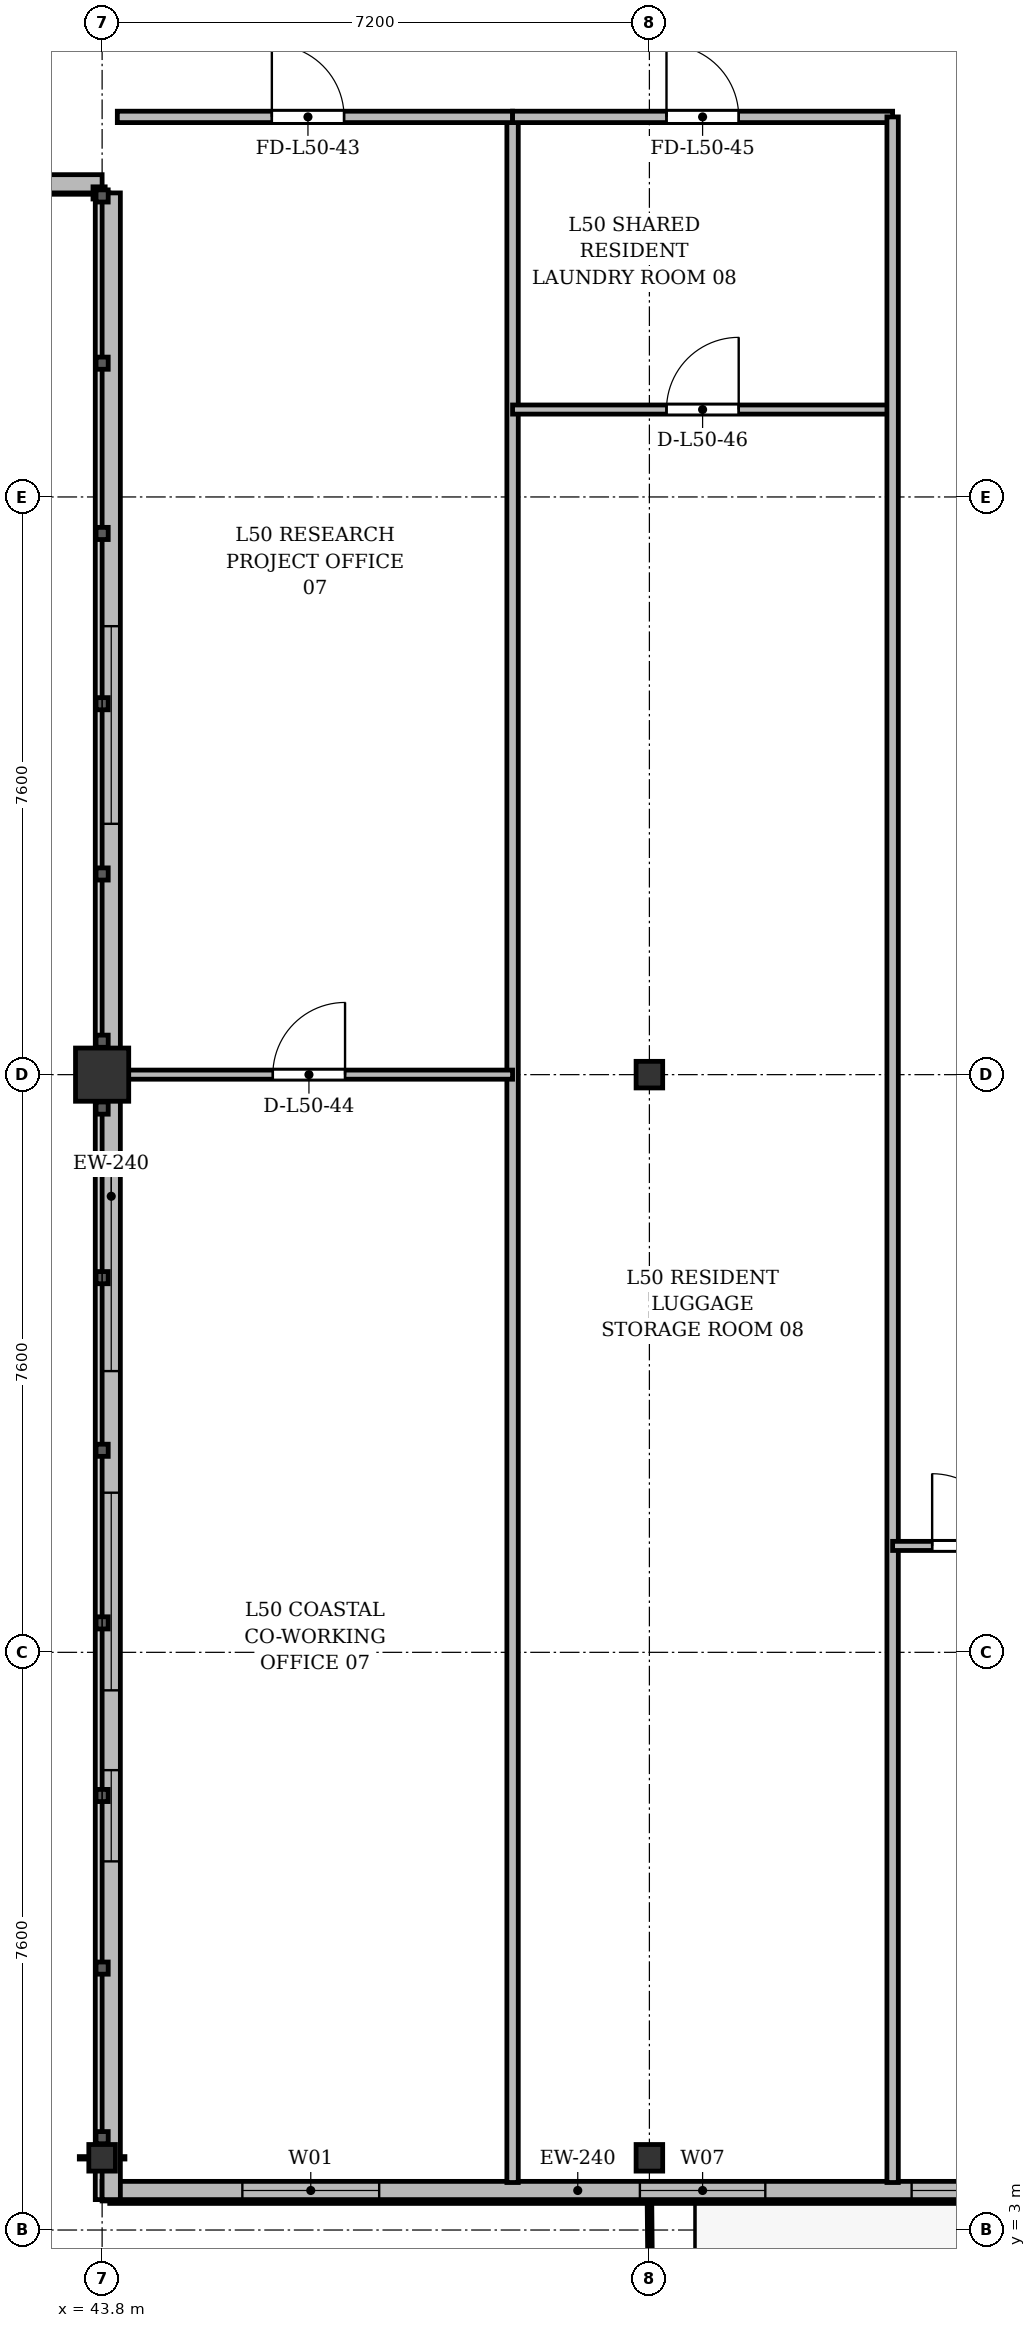
"""IFC4 building model, lengths in metres.
Left out: names, types, materials, properties, quantities, classifications, styles, units other than length and angle.
Written with IfcOpenShell. Run it as: python <this file> out.ifc"""

import sys

from ifc_helpers import new_model, si_unit, direction, frame, frame_2d, origin, origin_2d, place, context, subcontext, project, spatial, rectangle, i_section, extrude, source, transform, mapped, element, fill, save


model = new_model("IFC4")
c1 = context("Model", 3, precision=1e-05, world=origin(), true_north=direction((0.0, 1.0)))
c2 = subcontext(c1, "Body", "Model", "MODEL_VIEW")
j1 = project(units=[si_unit("LENGTHUNIT", "METRE"), si_unit("PLANEANGLEUNIT", "RADIAN")], contexts=[c1])
p1 = place(None, origin())
s1 = spatial("IfcSite", under=j1, at=p1, CompositionType="ELEMENT")
p2 = place(p1, origin())
s2 = spatial("IfcBuilding", under=s1, at=p2, CompositionType="ELEMENT")
p3 = place(p2, frame((0.0, 0.0, 194.1)))
s3 = spatial("IfcBuildingStorey", under=s2, at=p3, CompositionType="ELEMENT", Elevation=194.1)
m1 = source(origin(), c2, "Body", "SweptSolid", [
    extrude(i_section(OverallWidth=0.35, OverallDepth=0.35, WebThickness=0.018, FlangeThickness=0.028, at=origin_2d()), origin(), (0.0, 0.0, 1.0), 3.6),
])
p4 = place(p3, frame((43.8, 3.95, 0.0), z_axis=(0.0, 0.0, 1.0), x_axis=(1.0, 0.0, 0.0)))
e1 = element("IfcColumn", 1, at=p4, inside=s3, PredefinedType="COLUMN", context=c2, shape_type="MappedRepresentation", body=[
    mapped(m1, transform((0.0, 0.0, 0.0), x_axis=(1.0, 0.0, 0.0), y_axis=(0.0, 1.0, 0.0), z_axis=(0.0, 0.0, 1.0), scale=1.0)),
])
m2 = source(origin(), c2, "Body", "SweptSolid", [
    extrude(rectangle(XDim=0.7, YDim=0.7, at=origin_2d()), origin(), (0.0, 0.0, 1.0), 3.6),
])
p5 = place(p3, frame((43.8, 18.2, 0.0), z_axis=(0.0, 0.0, 1.0), x_axis=(1.0, 0.0, 0.0)))
e2 = element("IfcColumn", 2, at=p5, inside=s3, PredefinedType="COLUMN", context=c2, shape_type="MappedRepresentation", body=[
    mapped(m2, transform((0.0, 0.0, 0.0), x_axis=(1.0, 0.0, 0.0), y_axis=(0.0, 1.0, 0.0), z_axis=(0.0, 0.0, 1.0), scale=1.0)),
])
for number, where, z_axis, x_axis in (
    (3, (51.0, 3.95, 0.0), (0.0, 0.0, 1.0), (1.0, 0.0, 0.0)),
    (4, (51.0, 18.2, 0.0), (0.0, 0.0, 1.0), (1.0, 0.0, 0.0)),
):
    element("IfcColumn", number, at=place(p3, frame(where, z_axis=z_axis, x_axis=x_axis)), inside=s3, PredefinedType="COLUMN", context=c2, shape_type="MappedRepresentation", body=[
        mapped(m1, transform((0.0, 0.0, 0.0), x_axis=(1.0, 0.0, 0.0), y_axis=(0.0, 1.0, 0.0), z_axis=(0.0, 0.0, 1.0), scale=1.0)),
    ])
p6 = place(p3, frame((63.4, 3.52, 0.0), z_axis=(0.0, 0.0, 1.0), x_axis=(-1.0, 0.0, 0.0)))
e5 = element("IfcWall", 5, at=p6, inside=s3, PredefinedType="SOLIDWALL", context=c2, shape_type="SweptSolid", body=[
    extrude(rectangle(XDim=19.6, YDim=0.24, at=frame_2d((9.8, 0.0))), origin(), (0.0, 0.0, 1.0), 3.36),
])
p7 = place(p6, frame((0.395, 0.0, 0.9)))
e6 = element("IfcOpeningElement", 6, at=p7, cuts=e5, PredefinedType="OPENING", context=c2, shape_type="SweptSolid", body=[
    extrude(rectangle(XDim=1.5, YDim=1.75, at=frame_2d((0.75, 0.875))), frame((0.0, 0.13, 0.0), z_axis=(0.0, -1.0, 0.0), x_axis=(1.0, 0.0, 0.0)), (0.0, 0.0, 1.0), 0.26),
])
p8 = place(p6, frame((2.7, 0.0, 0.9)))
e7 = element("IfcOpeningElement", 7, at=p8, cuts=e5, PredefinedType="OPENING", context=c2, shape_type="SweptSolid", body=[
    extrude(rectangle(XDim=1.5, YDim=1.75, at=frame_2d((0.75, 0.875))), frame((0.0, 0.13, 0.0), z_axis=(0.0, -1.0, 0.0), x_axis=(1.0, 0.0, 0.0)), (0.0, 0.0, 1.0), 0.26),
])
p9 = place(p6, frame((5.585, 0.0, 0.0)))
e8 = element("IfcOpeningElement", 8, at=p9, cuts=e5, PredefinedType="OPENING", context=c2, shape_type="SweptSolid", body=[
    extrude(rectangle(XDim=1.2, YDim=2.2, at=frame_2d((0.6, 1.1))), frame((0.0, 0.13, 0.0), z_axis=(0.0, -1.0, 0.0), x_axis=(1.0, 0.0, 0.0)), (0.0, 0.0, 1.0), 0.26),
])
p10 = place(p6, frame((7.45, 0.0, 0.9)))
e9 = element("IfcOpeningElement", 9, at=p10, cuts=e5, PredefinedType="OPENING", context=c2, shape_type="SweptSolid", body=[
    extrude(rectangle(XDim=1.5, YDim=1.75, at=frame_2d((0.75, 0.875))), frame((0.0, 0.13, 0.0), z_axis=(0.0, -1.0, 0.0), x_axis=(1.0, 0.0, 0.0)), (0.0, 0.0, 1.0), 0.26),
])
p11 = place(p6, frame((10.875, 0.0, 0.9)))
e10 = element("IfcOpeningElement", 10, at=p11, cuts=e5, PredefinedType="OPENING", context=c2, shape_type="SweptSolid", body=[
    extrude(rectangle(XDim=1.65, YDim=1.85, at=frame_2d((0.825, 0.925))), frame((0.0, 0.13, 0.0), z_axis=(0.0, -1.0, 0.0), x_axis=(1.0, 0.0, 0.0)), (0.0, 0.0, 1.0), 0.26),
])
p12 = place(p6, frame((15.955, 0.0, 0.9)))
e11 = element("IfcOpeningElement", 11, at=p12, cuts=e5, PredefinedType="OPENING", context=c2, shape_type="SweptSolid", body=[
    extrude(rectangle(XDim=1.8, YDim=1.8, at=frame_2d((0.9, 0.9))), frame((0.0, 0.13, 0.0), z_axis=(0.0, -1.0, 0.0), x_axis=(1.0, 0.0, 0.0)), (0.0, 0.0, 1.0), 0.26),
])
p13 = place(p3, frame((43.92, 3.4, 0.0), z_axis=(0.0, 0.0, 1.0), x_axis=(0.0, 1.0, 0.0)))
e12 = element("IfcWall", 12, at=p13, inside=s3, PredefinedType="SOLIDWALL", context=c2, shape_type="SweptSolid", body=[
    extrude(rectangle(XDim=26.4, YDim=0.24, at=frame_2d((13.2, 0.0))), origin(), (0.0, 0.0, 1.0), 2.86),
])
p14 = place(p13, frame((4.45, 0.0, 0.92)))
e13 = element("IfcOpeningElement", 13, at=p14, cuts=e12, PredefinedType="OPENING", context=c2, shape_type="SweptSolid", body=[
    extrude(rectangle(XDim=1.2, YDim=1.65, at=frame_2d((0.6, 0.825))), frame((0.0, 0.13, 0.0), z_axis=(0.0, -1.0, 0.0), x_axis=(1.0, 0.0, 0.0)), (0.0, 0.0, 1.0), 0.26),
])
p15 = place(p13, frame((6.7, 0.0, 0.92)))
e14 = element("IfcOpeningElement", 14, at=p15, cuts=e12, PredefinedType="OPENING", context=c2, shape_type="SweptSolid", body=[
    extrude(rectangle(XDim=2.6, YDim=1.84, at=frame_2d((1.3, 0.92))), frame((0.0, 0.13, 0.0), z_axis=(0.0, -1.0, 0.0), x_axis=(1.0, 0.0, 0.0)), (0.0, 0.0, 1.0), 0.26),
])
p16 = place(p13, frame((10.9, 0.0, 0.92)))
e15 = element("IfcOpeningElement", 15, at=p16, cuts=e12, PredefinedType="OPENING", context=c2, shape_type="SweptSolid", body=[
    extrude(rectangle(XDim=2.6, YDim=1.84, at=frame_2d((1.3, 0.92))), frame((0.0, 0.13, 0.0), z_axis=(0.0, -1.0, 0.0), x_axis=(1.0, 0.0, 0.0)), (0.0, 0.0, 1.0), 0.26),
])
p17 = place(p13, frame((18.1, 0.0, 0.92)))
e16 = element("IfcOpeningElement", 16, at=p17, cuts=e12, PredefinedType="OPENING", context=c2, shape_type="SweptSolid", body=[
    extrude(rectangle(XDim=2.6, YDim=1.84, at=frame_2d((1.3, 0.92))), frame((0.0, 0.13, 0.0), z_axis=(0.0, -1.0, 0.0), x_axis=(1.0, 0.0, 0.0)), (0.0, 0.0, 1.0), 0.26),
])
p18 = place(p3, frame((43.8, 29.92, 0.0), z_axis=(0.0, 0.0, 1.0), x_axis=(-1.0, 0.0, 0.0)))
e17 = element("IfcWall", 17, at=p18, inside=s3, PredefinedType="SOLIDWALL", context=c2, shape_type="SweptSolid", body=[
    extrude(rectangle(XDim=13.2, YDim=0.24, at=frame_2d((6.6, 0.0))), origin(), (0.0, 0.0, 1.0), 2.86),
])
p19 = place(p18, frame((5.7, 0.0, 0.9)))
e18 = element("IfcOpeningElement", 18, at=p19, cuts=e17, PredefinedType="OPENING", context=c2, shape_type="SweptSolid", body=[
    extrude(rectangle(XDim=1.8, YDim=1.8, at=frame_2d((0.9, 0.9))), frame((0.0, 0.13, 0.0), z_axis=(0.0, -1.0, 0.0), x_axis=(1.0, 0.0, 0.0)), (0.0, 0.0, 1.0), 0.26),
])
p20 = place(p3, frame((49.2, 3.625, 0.0), z_axis=(0.0, 0.0, 1.0), x_axis=(0.0, 1.0, 0.0)))
e19 = element("IfcWall", 19, at=p20, inside=s3, PredefinedType="PARTITIONING", context=c2, shape_type="SweptSolid", body=[
    extrude(rectangle(XDim=27.175, YDim=0.15, at=frame_2d((13.587, 0.0))), origin(), (0.0, 0.0, 1.0), 2.91),
])
p21 = place(p3, frame((44.0, 30.8, 0.0), z_axis=(0.0, 0.0, 1.0), x_axis=(1.0, 0.0, 0.0)))
e20 = element("IfcWall", 20, at=p21, inside=s3, PredefinedType="PARTITIONING", context=c2, shape_type="SweptSolid", body=[
    extrude(rectangle(XDim=5.2, YDim=0.15, at=frame_2d((2.6, 0.0))), origin(), (0.0, 0.0, 1.0), 3.36),
])
p22 = place(p21, frame((2.033, 0.0, 0.0)))
e21 = element("IfcOpeningElement", 21, at=p22, cuts=e20, PredefinedType="OPENING", context=c2, shape_type="SweptSolid", body=[
    extrude(rectangle(XDim=0.95, YDim=2.15, at=frame_2d((0.475, 1.075))), frame((0.0, 0.085, 0.0), z_axis=(0.0, -1.0, 0.0), x_axis=(1.0, 0.0, 0.0)), (0.0, 0.0, 1.0), 0.17),
])
p23 = place(p3, frame((44.025, 18.2, 0.0), z_axis=(0.0, 0.0, 1.0), x_axis=(1.0, 0.0, 0.0)))
e22 = element("IfcWall", 22, at=p23, inside=s3, PredefinedType="PARTITIONING", context=c2, shape_type="SweptSolid", body=[
    extrude(rectangle(XDim=5.175, YDim=0.12, at=frame_2d((2.587, 0.0))), origin(), (0.0, 0.0, 1.0), 2.91),
])
p24 = place(p23, frame((2.021, 0.0, 0.0)))
e23 = element("IfcOpeningElement", 23, at=p24, cuts=e22, PredefinedType="OPENING", context=c2, shape_type="SweptSolid", body=[
    extrude(rectangle(XDim=0.95, YDim=2.15, at=frame_2d((0.475, 1.075))), frame((0.0, 0.07, 0.0), z_axis=(0.0, -1.0, 0.0), x_axis=(1.0, 0.0, 0.0)), (0.0, 0.0, 1.0), 0.14),
])
p25 = place(p3, frame((49.2, 30.8, 0.0), z_axis=(0.0, 0.0, 1.0), x_axis=(1.0, 0.0, 0.0)))
e24 = element("IfcWall", 24, at=p25, inside=s3, PredefinedType="PARTITIONING", context=c2, shape_type="SweptSolid", body=[
    extrude(rectangle(XDim=5.0, YDim=0.15, at=frame_2d((2.5, 0.0))), origin(), (0.0, 0.0, 1.0), 2.86),
])
p26 = place(p25, frame((2.025, 0.0, 0.0)))
e25 = element("IfcOpeningElement", 25, at=p26, cuts=e24, PredefinedType="OPENING", context=c2, shape_type="SweptSolid", body=[
    extrude(rectangle(XDim=0.95, YDim=2.15, at=frame_2d((0.475, 1.075))), frame((0.0, 0.085, 0.0), z_axis=(0.0, -1.0, 0.0), x_axis=(1.0, 0.0, 0.0)), (0.0, 0.0, 1.0), 0.17),
])
p27 = place(p3, frame((49.2, 26.95, 0.0), z_axis=(0.0, 0.0, 1.0), x_axis=(1.0, 0.0, 0.0)))
e26 = element("IfcWall", 26, at=p27, inside=s3, PredefinedType="PARTITIONING", context=c2, shape_type="SweptSolid", body=[
    extrude(rectangle(XDim=5.0, YDim=0.12, at=frame_2d((2.5, 0.0))), origin(), (0.0, 0.0, 1.0), 2.86),
])
p28 = place(p27, frame((2.025, 0.0, 0.0)))
e27 = element("IfcOpeningElement", 27, at=p28, cuts=e26, PredefinedType="OPENING", context=c2, shape_type="SweptSolid", body=[
    extrude(rectangle(XDim=0.95, YDim=2.15, at=frame_2d((0.475, 1.075))), frame((0.0, 0.07, 0.0), z_axis=(0.0, -1.0, 0.0), x_axis=(1.0, 0.0, 0.0)), (0.0, 0.0, 1.0), 0.14),
])
p29 = place(p3, frame((54.2, 3.625, 0.0), z_axis=(0.0, 0.0, 1.0), x_axis=(0.0, 1.0, 0.0)))
e28 = element("IfcWall", 28, at=p29, inside=s3, PredefinedType="PARTITIONING", context=c2, shape_type="SweptSolid", body=[
    extrude(rectangle(XDim=27.175, YDim=0.15, at=frame_2d((13.587, 0.0))), origin(), (0.0, 0.0, 1.0), 2.91),
])
p30 = place(p3, frame((54.2, 12.0, 0.0), z_axis=(0.0, 0.0, 1.0), x_axis=(1.0, 0.0, 0.0)))
e29 = element("IfcWall", 29, at=p30, inside=s3, PredefinedType="PARTITIONING", context=c2, shape_type="SweptSolid", body=[
    extrude(rectangle(XDim=2.0, YDim=0.12, at=frame_2d((1.0, 0.0))), origin(), (0.0, 0.0, 1.0), 3.36),
])
p31 = place(p30, frame((0.52, 0.0, 0.0)))
e30 = element("IfcOpeningElement", 30, at=p31, cuts=e29, PredefinedType="OPENING", context=c2, shape_type="SweptSolid", body=[
    extrude(rectangle(XDim=0.95, YDim=2.15, at=frame_2d((0.475, 1.075))), frame((0.0, 0.07, 0.0), z_axis=(0.0, -1.0, 0.0), x_axis=(1.0, 0.0, 0.0)), (0.0, 0.0, 1.0), 0.14),
])
m3 = source(origin(), c2, "Body", "SweptSolid", [
    extrude(rectangle(XDim=1.5, YDim=1.75, at=frame_2d((0.75, 0.875))), frame((0.0, 0.03, 0.0), z_axis=(0.0, -1.0, 0.0), x_axis=(1.0, 0.0, 0.0)), (0.0, 0.0, 1.0), 0.06),
])
p32 = place(p10, origin())
e31 = element("IfcWindow", 31, at=p32, inside=s3, PartitioningType="SINGLE_PANEL", PredefinedType="WINDOW", context=c2, shape_type="MappedRepresentation", body=[
    mapped(m3, transform((0.0, 0.0, 0.0), x_axis=(1.0, 0.0, 0.0), y_axis=(0.0, 1.0, 0.0), z_axis=(0.0, 0.0, 1.0), scale=1.0)),
])
fill(e9, e31)
m4 = source(origin(), c2, "Body", "SweptSolid", [
    extrude(rectangle(XDim=1.65, YDim=1.85, at=frame_2d((0.825, 0.925))), frame((0.0, 0.03, 0.0), z_axis=(0.0, -1.0, 0.0), x_axis=(1.0, 0.0, 0.0)), (0.0, 0.0, 1.0), 0.06),
])
p33 = place(p11, origin())
e32 = element("IfcWindow", 32, at=p33, inside=s3, PartitioningType="SINGLE_PANEL", PredefinedType="WINDOW", context=c2, shape_type="MappedRepresentation", body=[
    mapped(m4, transform((0.0, 0.0, 0.0), x_axis=(1.0, 0.0, 0.0), y_axis=(0.0, 1.0, 0.0), z_axis=(0.0, 0.0, 1.0), scale=1.0)),
])
fill(e10, e32)
m5 = source(origin(), c2, "Body", "SweptSolid", [
    extrude(rectangle(XDim=1.8, YDim=1.8, at=frame_2d((0.9, 0.9))), frame((0.0, 0.03, 0.0), z_axis=(0.0, -1.0, 0.0), x_axis=(1.0, 0.0, 0.0)), (0.0, 0.0, 1.0), 0.06),
])
p34 = place(p12, origin())
e33 = element("IfcWindow", 33, at=p34, inside=s3, PartitioningType="SINGLE_PANEL", PredefinedType="WINDOW", context=c2, shape_type="MappedRepresentation", body=[
    mapped(m5, transform((0.0, 0.0, 0.0), x_axis=(1.0, 0.0, 0.0), y_axis=(0.0, 1.0, 0.0), z_axis=(0.0, 0.0, 1.0), scale=1.0)),
])
fill(e11, e33)
m6 = source(origin(), c2, "Body", "SweptSolid", [
    extrude(rectangle(XDim=1.2, YDim=1.65, at=frame_2d((0.6, 0.825))), frame((0.0, 0.03, 0.0), z_axis=(0.0, -1.0, 0.0), x_axis=(1.0, 0.0, 0.0)), (0.0, 0.0, 1.0), 0.06),
])
p35 = place(p14, origin())
e34 = element("IfcWindow", 34, at=p35, inside=s3, PartitioningType="SINGLE_PANEL", PredefinedType="WINDOW", context=c2, shape_type="MappedRepresentation", body=[
    mapped(m6, transform((0.0, 0.0, 0.0), x_axis=(1.0, 0.0, 0.0), y_axis=(0.0, 1.0, 0.0), z_axis=(0.0, 0.0, 1.0), scale=1.0)),
])
fill(e13, e34)
m7 = source(origin(), c2, "Body", "SweptSolid", [
    extrude(rectangle(XDim=2.6, YDim=1.84, at=frame_2d((1.3, 0.92))), frame((0.0, 0.03, 0.0), z_axis=(0.0, -1.0, 0.0), x_axis=(1.0, 0.0, 0.0)), (0.0, 0.0, 1.0), 0.06),
])
p36 = place(p15, origin())
e35 = element("IfcWindow", 35, at=p36, inside=s3, PartitioningType="SINGLE_PANEL", PredefinedType="WINDOW", context=c2, shape_type="MappedRepresentation", body=[
    mapped(m7, transform((0.0, 0.0, 0.0), x_axis=(1.0, 0.0, 0.0), y_axis=(0.0, 1.0, 0.0), z_axis=(0.0, 0.0, 1.0), scale=1.0)),
])
fill(e14, e35)
p37 = place(p16, origin())
e36 = element("IfcWindow", 36, at=p37, inside=s3, PartitioningType="SINGLE_PANEL", PredefinedType="WINDOW", context=c2, shape_type="MappedRepresentation", body=[
    mapped(m7, transform((0.0, 0.0, 0.0), x_axis=(1.0, 0.0, 0.0), y_axis=(0.0, 1.0, 0.0), z_axis=(0.0, 0.0, 1.0), scale=1.0)),
])
fill(e15, e36)
p38 = place(p17, origin())
e37 = element("IfcWindow", 37, at=p38, inside=s3, PartitioningType="SINGLE_PANEL", PredefinedType="WINDOW", context=c2, shape_type="MappedRepresentation", body=[
    mapped(m7, transform((0.0, 0.0, 0.0), x_axis=(1.0, 0.0, 0.0), y_axis=(0.0, 1.0, 0.0), z_axis=(0.0, 0.0, 1.0), scale=1.0)),
])
fill(e16, e37)
m8 = source(origin(), c2, "Body", "SweptSolid", [
    extrude(rectangle(XDim=0.95, YDim=2.15, at=frame_2d((0.475, 1.075))), frame((0.0, 0.025, 0.0), z_axis=(0.0, -1.0, 0.0), x_axis=(1.0, 0.0, 0.0)), (0.0, 0.0, 1.0), 0.05),
])
p39 = place(p22, origin())
e38 = element("IfcDoor", 38, at=p39, inside=s3, OperationType="SINGLE_SWING_LEFT", PredefinedType="DOOR", context=c2, shape_type="MappedRepresentation", body=[
    mapped(m8, transform((0.0, 0.0, 0.0), x_axis=(1.0, 0.0, 0.0), y_axis=(0.0, 1.0, 0.0), z_axis=(0.0, 0.0, 1.0), scale=1.0)),
])
fill(e21, e38)
p40 = place(p24, origin())
e39 = element("IfcDoor", 39, at=p40, inside=s3, OperationType="SINGLE_SWING_RIGHT", PredefinedType="DOOR", context=c2, shape_type="MappedRepresentation", body=[
    mapped(m8, transform((0.0, 0.0, 0.0), x_axis=(1.0, 0.0, 0.0), y_axis=(0.0, 1.0, 0.0), z_axis=(0.0, 0.0, 1.0), scale=1.0)),
])
fill(e23, e39)
p41 = place(p26, origin())
e40 = element("IfcDoor", 40, at=p41, inside=s3, OperationType="SINGLE_SWING_LEFT", PredefinedType="DOOR", context=c2, shape_type="MappedRepresentation", body=[
    mapped(m8, transform((0.0, 0.0, 0.0), x_axis=(1.0, 0.0, 0.0), y_axis=(0.0, 1.0, 0.0), z_axis=(0.0, 0.0, 1.0), scale=1.0)),
])
fill(e25, e40)
p42 = place(p28, origin())
e41 = element("IfcDoor", 41, at=p42, inside=s3, OperationType="SINGLE_SWING_RIGHT", PredefinedType="DOOR", context=c2, shape_type="MappedRepresentation", body=[
    mapped(m8, transform((0.0, 0.0, 0.0), x_axis=(1.0, 0.0, 0.0), y_axis=(0.0, 1.0, 0.0), z_axis=(0.0, 0.0, 1.0), scale=1.0)),
])
fill(e27, e41)
p43 = place(p31, origin())
e42 = element("IfcDoor", 42, at=p43, inside=s3, OperationType="SINGLE_SWING_LEFT", PredefinedType="DOOR", context=c2, shape_type="MappedRepresentation", body=[
    mapped(m8, transform((0.0, 0.0, 0.0), x_axis=(1.0, 0.0, 0.0), y_axis=(0.0, 1.0, 0.0), z_axis=(0.0, 0.0, 1.0), scale=1.0)),
])
fill(e30, e42)
save(model, sys.argv[1])
